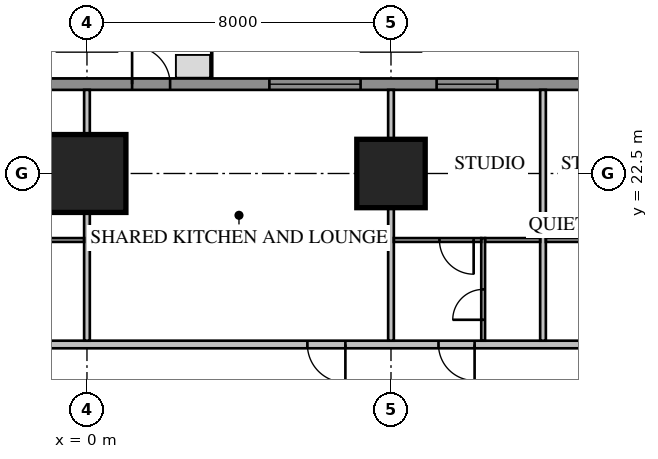
"""IFC4 building model, lengths in metres.
Left out: names, types, materials, properties, quantities, classifications, styles, units other than length and angle.
Written with IfcOpenShell. Run it as: python <this file> out.ifc"""

import sys

from ifc_helpers import new_model, si_unit, direction, frame, frame_2d, origin, origin_2d, place, context, subcontext, project, spatial, rectangle, extrude, element, fill, save


model = new_model("IFC4")
c1 = context("Model", 3, precision=1e-05, world=origin(), true_north=direction((0.0, 1.0)))
c2 = subcontext(c1, "Body", "Model", "MODEL_VIEW")
j1 = project(units=[si_unit("LENGTHUNIT", "METRE"), si_unit("PLANEANGLEUNIT", "RADIAN")], contexts=[c1])
p1 = place(None, origin())
s1 = spatial("IfcSite", under=j1, at=p1, CompositionType="ELEMENT")
p2 = place(p1, origin())
s2 = spatial("IfcBuilding", under=s1, at=p2, CompositionType="ELEMENT")
p3 = place(p2, frame((0.0, 0.0, 27.55)))
s3 = spatial("IfcBuildingStorey", under=s2, at=p3, CompositionType="ELEMENT", Elevation=27.55)
p4 = place(p3, frame((8.0, 22.5, 0.0), z_axis=(0.0, 0.0, 1.0), x_axis=(1.0, 0.0, 0.0)))
e1 = element("IfcColumn", 1, at=p4, inside=s3, PredefinedType="COLUMN", context=c2, shape_type="SweptSolid", body=[
    extrude(rectangle(XDim=1.8, YDim=1.8, at=origin_2d()), origin(), (0.0, 0.0, 1.0), 3.85),
])
p5 = place(p3, frame((0.0, 22.5, 0.0), z_axis=(0.0, 0.0, 1.0), x_axis=(1.0, 0.0, 0.0)))
e2 = element("IfcColumn", 2, at=p5, inside=s3, PredefinedType="COLUMN", context=c2, shape_type="SweptSolid", body=[
    extrude(rectangle(XDim=2.05, YDim=2.05, at=origin_2d()), origin(), (0.0, 0.0, 1.0), 3.85),
])
p6 = place(p3, frame((16.0, 24.85, 0.0), z_axis=(0.0, 0.0, 1.0), x_axis=(-1.0, 0.0, 0.0)))
e3 = element("IfcWall", 3, at=p6, inside=s3, PredefinedType="SOLIDWALL", context=c2, shape_type="SweptSolid", body=[
    extrude(rectangle(XDim=32.0, YDim=0.3, at=frame_2d((16.0, 0.0))), origin(), (0.0, 0.0, 1.0), 3.65),
])
p7 = place(p6, frame((1.2, 0.0, 0.75)))
e4 = element("IfcOpeningElement", 4, at=p7, cuts=e3, PredefinedType="OPENING", context=c2, shape_type="SweptSolid", body=[
    extrude(rectangle(XDim=1.6, YDim=1.8, at=frame_2d((0.8, 0.9))), frame((0.0, 0.17, 0.0), z_axis=(0.0, -1.0, 0.0), x_axis=(1.0, 0.0, 0.0)), (0.0, 0.0, 1.0), 0.34),
])
p8 = place(p6, frame((5.2, 0.0, 0.75)))
e5 = element("IfcOpeningElement", 5, at=p8, cuts=e3, PredefinedType="OPENING", context=c2, shape_type="SweptSolid", body=[
    extrude(rectangle(XDim=1.6, YDim=1.8, at=frame_2d((0.8, 0.9))), frame((0.0, 0.17, 0.0), z_axis=(0.0, -1.0, 0.0), x_axis=(1.0, 0.0, 0.0)), (0.0, 0.0, 1.0), 0.34),
])
p9 = place(p6, frame((17.2, 0.0, 0.75)))
e6 = element("IfcOpeningElement", 6, at=p9, cuts=e3, PredefinedType="OPENING", context=c2, shape_type="SweptSolid", body=[
    extrude(rectangle(XDim=1.6, YDim=1.8, at=frame_2d((0.8, 0.9))), frame((0.0, 0.17, 0.0), z_axis=(0.0, -1.0, 0.0), x_axis=(1.0, 0.0, 0.0)), (0.0, 0.0, 1.0), 0.34),
])
p10 = place(p6, frame((21.2, 0.0, 0.75)))
e7 = element("IfcOpeningElement", 7, at=p10, cuts=e3, PredefinedType="OPENING", context=c2, shape_type="SweptSolid", body=[
    extrude(rectangle(XDim=1.6, YDim=1.8, at=frame_2d((0.8, 0.9))), frame((0.0, 0.17, 0.0), z_axis=(0.0, -1.0, 0.0), x_axis=(1.0, 0.0, 0.0)), (0.0, 0.0, 1.0), 0.34),
])
p11 = place(p6, frame((25.2, 0.0, 0.75)))
e8 = element("IfcOpeningElement", 8, at=p11, cuts=e3, PredefinedType="OPENING", context=c2, shape_type="SweptSolid", body=[
    extrude(rectangle(XDim=1.6, YDim=1.8, at=frame_2d((0.8, 0.9))), frame((0.0, 0.17, 0.0), z_axis=(0.0, -1.0, 0.0), x_axis=(1.0, 0.0, 0.0)), (0.0, 0.0, 1.0), 0.34),
])
p12 = place(p6, frame((29.2, 0.0, 0.75)))
e9 = element("IfcOpeningElement", 9, at=p12, cuts=e3, PredefinedType="OPENING", context=c2, shape_type="SweptSolid", body=[
    extrude(rectangle(XDim=1.6, YDim=1.8, at=frame_2d((0.8, 0.9))), frame((0.0, 0.17, 0.0), z_axis=(0.0, -1.0, 0.0), x_axis=(1.0, 0.0, 0.0)), (0.0, 0.0, 1.0), 0.34),
])
p13 = place(p6, frame((8.8, 0.0, 0.75)))
e10 = element("IfcOpeningElement", 10, at=p13, cuts=e3, PredefinedType="OPENING", context=c2, shape_type="SweptSolid", body=[
    extrude(rectangle(XDim=2.4, YDim=1.8, at=frame_2d((1.2, 0.9))), frame((0.0, 0.17, 0.0), z_axis=(0.0, -1.0, 0.0), x_axis=(1.0, 0.0, 0.0)), (0.0, 0.0, 1.0), 0.34),
])
p14 = place(p6, frame((13.812, 0.0, 0.0)))
e11 = element("IfcOpeningElement", 11, at=p14, cuts=e3, PredefinedType="OPENING", context=c2, shape_type="SweptSolid", body=[
    extrude(rectangle(XDim=1.0, YDim=2.4, at=frame_2d((0.5, 1.2))), frame((0.0, 0.17, 0.0), z_axis=(0.0, -1.0, 0.0), x_axis=(1.0, 0.0, 0.0)), (0.0, 0.0, 1.0), 0.34),
])
p15 = place(p3, frame((18.0, 18.0, 0.0), z_axis=(0.0, 0.0, 1.0), x_axis=(-1.0, 0.0, 0.0)))
e12 = element("IfcWall", 12, at=p15, inside=s3, PredefinedType="PARTITIONING", context=c2, shape_type="SweptSolid", body=[
    extrude(rectangle(XDim=36.0, YDim=0.2, at=frame_2d((18.0, 0.0))), origin(), (0.0, 0.0, 1.0), 3.65),
])
p16 = place(p15, frame((0.375, 0.0, 0.0)))
e13 = element("IfcOpeningElement", 13, at=p16, cuts=e12, PredefinedType="OPENING", context=c2, shape_type="SweptSolid", body=[
    extrude(rectangle(XDim=1.0, YDim=2.1, at=frame_2d((0.5, 1.05))), frame((0.0, 0.12, 0.0), z_axis=(0.0, -1.0, 0.0), x_axis=(1.0, 0.0, 0.0)), (0.0, 0.0, 1.0), 0.24),
])
p17 = place(p15, frame((3.8, 0.0, 0.0)))
e14 = element("IfcOpeningElement", 14, at=p17, cuts=e12, PredefinedType="OPENING", context=c2, shape_type="SweptSolid", body=[
    extrude(rectangle(XDim=0.95, YDim=2.1, at=frame_2d((0.475, 1.05))), frame((0.0, 0.12, 0.0), z_axis=(0.0, -1.0, 0.0), x_axis=(1.0, 0.0, 0.0)), (0.0, 0.0, 1.0), 0.24),
])
p18 = place(p15, frame((7.8, 0.0, 0.0)))
e15 = element("IfcOpeningElement", 15, at=p18, cuts=e12, PredefinedType="OPENING", context=c2, shape_type="SweptSolid", body=[
    extrude(rectangle(XDim=0.95, YDim=2.1, at=frame_2d((0.475, 1.05))), frame((0.0, 0.12, 0.0), z_axis=(0.0, -1.0, 0.0), x_axis=(1.0, 0.0, 0.0)), (0.0, 0.0, 1.0), 0.24),
])
p19 = place(p15, frame((19.8, 0.0, 0.0)))
e16 = element("IfcOpeningElement", 16, at=p19, cuts=e12, PredefinedType="OPENING", context=c2, shape_type="SweptSolid", body=[
    extrude(rectangle(XDim=0.95, YDim=2.1, at=frame_2d((0.475, 1.05))), frame((0.0, 0.12, 0.0), z_axis=(0.0, -1.0, 0.0), x_axis=(1.0, 0.0, 0.0)), (0.0, 0.0, 1.0), 0.24),
])
p20 = place(p15, frame((23.8, 0.0, 0.0)))
e17 = element("IfcOpeningElement", 17, at=p20, cuts=e12, PredefinedType="OPENING", context=c2, shape_type="SweptSolid", body=[
    extrude(rectangle(XDim=0.95, YDim=2.1, at=frame_2d((0.475, 1.05))), frame((0.0, 0.12, 0.0), z_axis=(0.0, -1.0, 0.0), x_axis=(1.0, 0.0, 0.0)), (0.0, 0.0, 1.0), 0.24),
])
p21 = place(p15, frame((27.8, 0.0, 0.0)))
e18 = element("IfcOpeningElement", 18, at=p21, cuts=e12, PredefinedType="OPENING", context=c2, shape_type="SweptSolid", body=[
    extrude(rectangle(XDim=0.95, YDim=2.1, at=frame_2d((0.475, 1.05))), frame((0.0, 0.12, 0.0), z_axis=(0.0, -1.0, 0.0), x_axis=(1.0, 0.0, 0.0)), (0.0, 0.0, 1.0), 0.24),
])
p22 = place(p15, frame((31.8, 0.0, 0.0)))
e19 = element("IfcOpeningElement", 19, at=p22, cuts=e12, PredefinedType="OPENING", context=c2, shape_type="SweptSolid", body=[
    extrude(rectangle(XDim=0.95, YDim=2.1, at=frame_2d((0.475, 1.05))), frame((0.0, 0.12, 0.0), z_axis=(0.0, -1.0, 0.0), x_axis=(1.0, 0.0, 0.0)), (0.0, 0.0, 1.0), 0.24),
])
p23 = place(p15, frame((34.375, 0.0, 0.0)))
e20 = element("IfcOpeningElement", 20, at=p23, cuts=e12, PredefinedType="OPENING", context=c2, shape_type="SweptSolid", body=[
    extrude(rectangle(XDim=0.95, YDim=2.1, at=frame_2d((0.475, 1.05))), frame((0.0, 0.12, 0.0), z_axis=(0.0, -1.0, 0.0), x_axis=(1.0, 0.0, 0.0)), (0.0, 0.0, 1.0), 0.24),
])
p24 = place(p15, frame((11.2, 0.0, 0.0)))
e21 = element("IfcOpeningElement", 21, at=p24, cuts=e12, PredefinedType="OPENING", context=c2, shape_type="SweptSolid", body=[
    extrude(rectangle(XDim=1.0, YDim=2.1, at=frame_2d((0.5, 1.05))), frame((0.0, 0.12, 0.0), z_axis=(0.0, -1.0, 0.0), x_axis=(1.0, 0.0, 0.0)), (0.0, 0.0, 1.0), 0.24),
])
for number, where, z_axis, x_axis in (
    (22, (12.0, 18.1, 0.0), (0.0, 0.0, 1.0), (0.0, 1.0, 0.0)),
    (23, (8.0, 18.1, 0.0), (0.0, 0.0, 1.0), (0.0, 1.0, 0.0)),
):
    element("IfcWall", number, at=place(p3, frame(where, z_axis=z_axis, x_axis=x_axis)), inside=s3, PredefinedType="PARTITIONING", context=c2, shape_type="SweptSolid", body=[
        extrude(rectangle(XDim=6.6, YDim=0.15, at=frame_2d((3.3, 0.0))), origin(), (0.0, 0.0, 1.0), 3.65),
    ])
p25 = place(p3, frame((0.0, 18.1, 0.0), z_axis=(0.0, 0.0, 1.0), x_axis=(0.0, 1.0, 0.0)))
e24 = element("IfcWall", 24, at=p25, inside=s3, PredefinedType="PARTITIONING", context=c2, shape_type="SweptSolid", body=[
    extrude(rectangle(XDim=6.6, YDim=0.15, at=frame_2d((3.3, 0.0))), origin(), (0.0, 0.0, 1.0), 2.809),
])
p26 = place(p3, frame((10.425, 18.1, 0.0), z_axis=(0.0, 0.0, 1.0), x_axis=(0.0, 1.0, 0.0)))
e25 = element("IfcWall", 25, at=p26, inside=s3, PredefinedType="PARTITIONING", context=c2, shape_type="SweptSolid", body=[
    extrude(rectangle(XDim=2.7, YDim=0.1, at=frame_2d((1.35, 0.0))), origin(), (0.0, 0.0, 1.0), 3.65),
])
p27 = place(p26, frame((0.55, 0.0, 0.0)))
e26 = element("IfcOpeningElement", 26, at=p27, cuts=e25, PredefinedType="OPENING", context=c2, shape_type="SweptSolid", body=[
    extrude(rectangle(XDim=0.8, YDim=2.1, at=frame_2d((0.4, 1.05))), frame((0.0, 0.07, 0.0), z_axis=(0.0, -1.0, 0.0), x_axis=(1.0, 0.0, 0.0)), (0.0, 0.0, 1.0), 0.14),
])
for number, where, z_axis, x_axis in (
    (27, (11.925, 20.75, 0.0), (0.0, 0.0, 1.0), (-1.0, 0.0, 0.0)),
    (28, (-0.075, 20.75, 0.0), (0.0, 0.0, 1.0), (-1.0, 0.0, 0.0)),
):
    element("IfcWall", number, at=place(p3, frame(where, z_axis=z_axis, x_axis=x_axis)), inside=s3, PredefinedType="PARTITIONING", context=c2, shape_type="SweptSolid", body=[
        extrude(rectangle(XDim=1.45, YDim=0.1, at=frame_2d((0.725, 0.0))), origin(), (0.0, 0.0, 1.0), 3.65),
    ])
p28 = place(p3, frame((14.375, 20.75, 0.0), z_axis=(0.0, 0.0, 1.0), x_axis=(-1.0, 0.0, 0.0)))
e29 = element("IfcWall", 29, at=p28, inside=s3, PredefinedType="PARTITIONING", context=c2, shape_type="SweptSolid", body=[
    extrude(rectangle(XDim=2.3, YDim=0.1, at=frame_2d((1.15, 0.0))), origin(), (0.0, 0.0, 1.0), 3.65),
])
p29 = place(p28, frame((0.2, 0.0, 0.0)))
e30 = element("IfcOpeningElement", 30, at=p29, cuts=e29, PredefinedType="OPENING", context=c2, shape_type="SweptSolid", body=[
    extrude(rectangle(XDim=0.9, YDim=2.1, at=frame_2d((0.45, 1.05))), frame((0.0, 0.07, 0.0), z_axis=(0.0, -1.0, 0.0), x_axis=(1.0, 0.0, 0.0)), (0.0, 0.0, 1.0), 0.14),
])
p30 = place(p3, frame((10.375, 20.75, 0.0), z_axis=(0.0, 0.0, 1.0), x_axis=(-1.0, 0.0, 0.0)))
e31 = element("IfcWall", 31, at=p30, inside=s3, PredefinedType="PARTITIONING", context=c2, shape_type="SweptSolid", body=[
    extrude(rectangle(XDim=2.3, YDim=0.1, at=frame_2d((1.15, 0.0))), origin(), (0.0, 0.0, 1.0), 3.65),
])
p31 = place(p30, frame((0.2, 0.0, 0.0)))
e32 = element("IfcOpeningElement", 32, at=p31, cuts=e31, PredefinedType="OPENING", context=c2, shape_type="SweptSolid", body=[
    extrude(rectangle(XDim=0.9, YDim=2.1, at=frame_2d((0.45, 1.05))), frame((0.0, 0.07, 0.0), z_axis=(0.0, -1.0, 0.0), x_axis=(1.0, 0.0, 0.0)), (0.0, 0.0, 1.0), 0.14),
])
p32 = place(p8, origin())
e33 = element("IfcWindow", 33, at=p32, inside=s3, PartitioningType="SINGLE_PANEL", PredefinedType="WINDOW", context=c2, shape_type="SweptSolid", body=[
    extrude(rectangle(XDim=1.6, YDim=1.8, at=frame_2d((0.8, 0.9))), frame((0.0, 0.03, 0.0), z_axis=(0.0, -1.0, 0.0), x_axis=(1.0, 0.0, 0.0)), (0.0, 0.0, 1.0), 0.06),
])
fill(e5, e33)
p33 = place(p13, origin())
e34 = element("IfcWindow", 34, at=p33, inside=s3, PartitioningType="SINGLE_PANEL", PredefinedType="WINDOW", context=c2, shape_type="SweptSolid", body=[
    extrude(rectangle(XDim=2.4, YDim=1.8, at=frame_2d((1.2, 0.9))), frame((0.0, 0.03, 0.0), z_axis=(0.0, -1.0, 0.0), x_axis=(1.0, 0.0, 0.0)), (0.0, 0.0, 1.0), 0.06),
])
fill(e10, e34)
p34 = place(p14, origin())
e35 = element("IfcDoor", 35, at=p34, inside=s3, OperationType="SINGLE_SWING_RIGHT", PredefinedType="DOOR", context=c2, shape_type="SweptSolid", body=[
    extrude(rectangle(XDim=1.0, YDim=2.4, at=frame_2d((0.5, 1.2))), frame((0.0, 0.025, 0.0), z_axis=(0.0, -1.0, 0.0), x_axis=(1.0, 0.0, 0.0)), (0.0, 0.0, 1.0), 0.05),
])
fill(e11, e35)
p35 = place(p18, origin())
e36 = element("IfcDoor", 36, at=p35, inside=s3, OperationType="SINGLE_SWING_LEFT", PredefinedType="DOOR", context=c2, shape_type="SweptSolid", body=[
    extrude(rectangle(XDim=0.95, YDim=2.1, at=frame_2d((0.475, 1.05))), frame((0.0, 0.025, 0.0), z_axis=(0.0, -1.0, 0.0), x_axis=(1.0, 0.0, 0.0)), (0.0, 0.0, 1.0), 0.05),
])
fill(e15, e36)
p36 = place(p27, origin())
e37 = element("IfcDoor", 37, at=p36, inside=s3, OperationType="SINGLE_SWING_LEFT", PredefinedType="DOOR", context=c2, shape_type="SweptSolid", body=[
    extrude(rectangle(XDim=0.8, YDim=2.1, at=frame_2d((0.4, 1.05))), frame((0.0, 0.025, 0.0), z_axis=(0.0, -1.0, 0.0), x_axis=(1.0, 0.0, 0.0)), (0.0, 0.0, 1.0), 0.05),
])
fill(e26, e37)
p37 = place(p24, origin())
e38 = element("IfcDoor", 38, at=p37, inside=s3, OperationType="SINGLE_SWING_LEFT", PredefinedType="DOOR", context=c2, shape_type="SweptSolid", body=[
    extrude(rectangle(XDim=1.0, YDim=2.1, at=frame_2d((0.5, 1.05))), frame((0.0, 0.025, 0.0), z_axis=(0.0, -1.0, 0.0), x_axis=(1.0, 0.0, 0.0)), (0.0, 0.0, 1.0), 0.05),
])
fill(e21, e38)
p38 = place(p31, origin())
e39 = element("IfcDoor", 39, at=p38, inside=s3, OperationType="SINGLE_SWING_LEFT", PredefinedType="DOOR", context=c2, shape_type="SweptSolid", body=[
    extrude(rectangle(XDim=0.9, YDim=2.1, at=frame_2d((0.45, 1.05))), frame((0.0, 0.025, 0.0), z_axis=(0.0, -1.0, 0.0), x_axis=(1.0, 0.0, 0.0)), (0.0, 0.0, 1.0), 0.05),
])
fill(e32, e39)
save(model, sys.argv[1])
